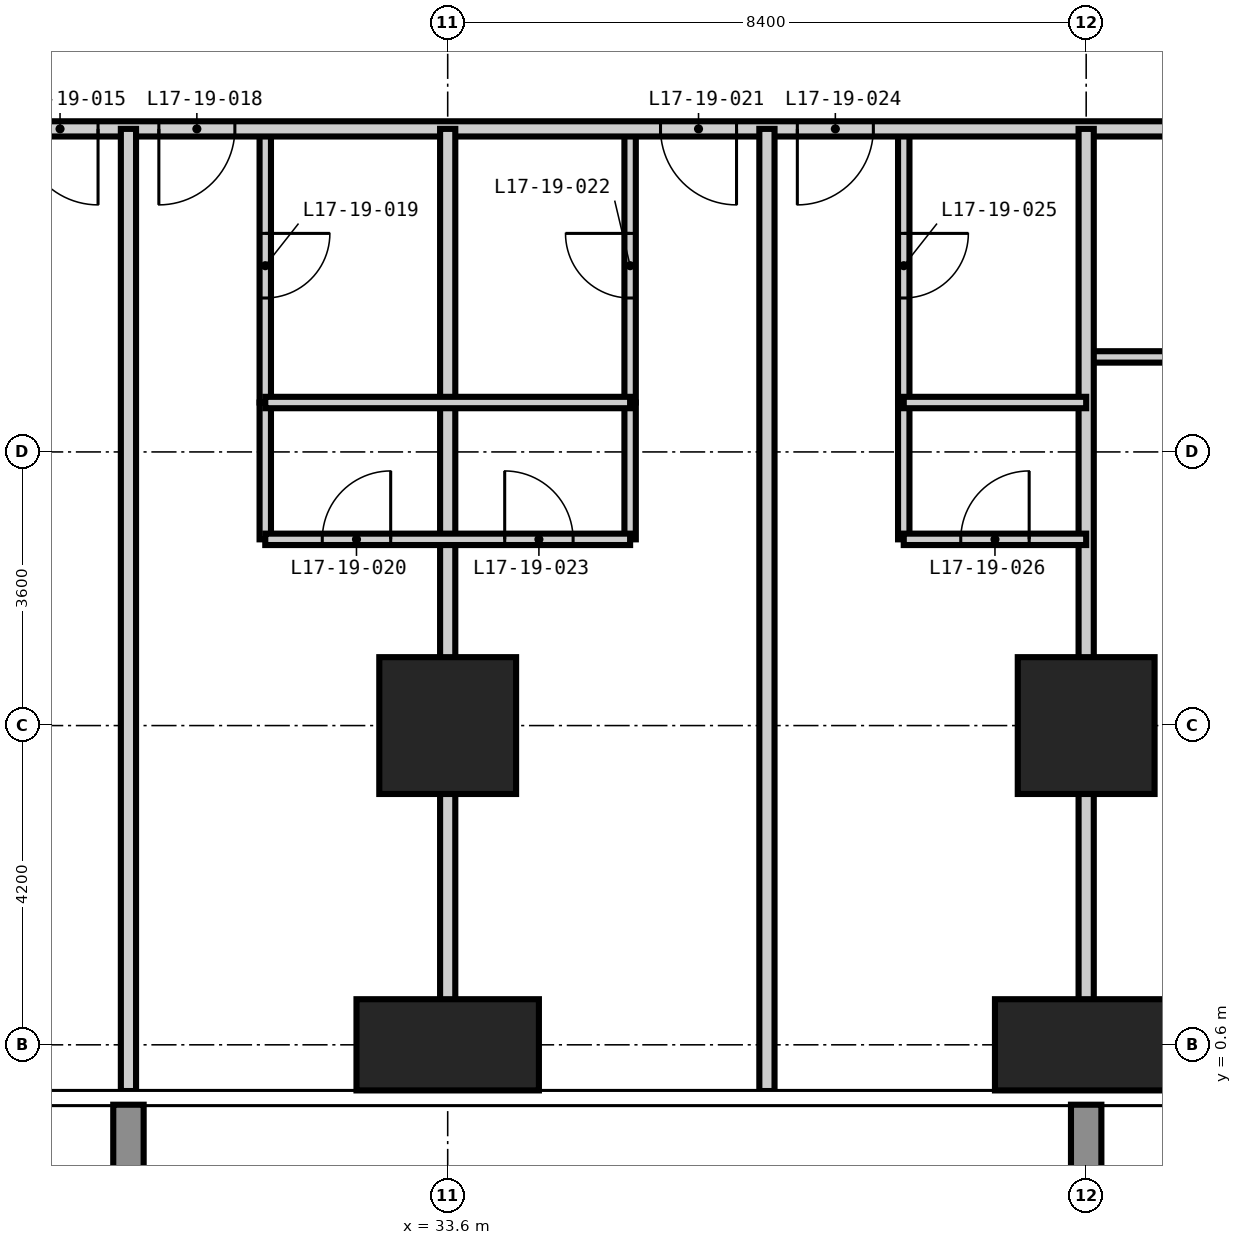
"""IFC4 building model, lengths in metres.
Left out: names, types, materials, properties, quantities, classifications, styles, units other than length and angle.
Written with IfcOpenShell. Run it as: python <this file> out.ifc"""

import sys

from ifc_helpers import new_model, si_unit, direction, frame, frame_2d, origin, origin_2d, place, context, subcontext, project, spatial, rectangle, extrude, element, fill, save


model = new_model("IFC4")
c1 = context("Model", 3, precision=1e-05, world=origin(), true_north=direction((0.0, 1.0)))
c2 = subcontext(c1, "Body", "Model", "MODEL_VIEW")
j1 = project(units=[si_unit("LENGTHUNIT", "METRE"), si_unit("PLANEANGLEUNIT", "RADIAN")], contexts=[c1])
p1 = place(None, origin())
s1 = spatial("IfcSite", under=j1, at=p1, CompositionType="ELEMENT")
p2 = place(p1, origin())
s2 = spatial("IfcBuilding", under=s1, at=p2, CompositionType="ELEMENT")
p3 = place(p2, frame((0.0, 0.0, 70.2)))
s3 = spatial("IfcBuildingStorey", under=s2, at=p3, CompositionType="ELEMENT", Elevation=70.2)
p4 = place(p3, frame((33.6, 0.6, -0.35), z_axis=(0.0, 0.0, 1.0), x_axis=(1.0, 0.0, 0.0)))
e1 = element("IfcColumn", 1, at=p4, inside=s3, PredefinedType="COLUMN", context=c2, shape_type="SweptSolid", body=[
    extrude(rectangle(XDim=2.4, YDim=1.2, at=origin_2d()), origin(), (0.0, 0.0, 1.0), 3.6),
])
p5 = place(p3, frame((33.6, 4.8, -0.35), z_axis=(0.0, 0.0, 1.0), x_axis=(1.0, 0.0, 0.0)))
e2 = element("IfcColumn", 2, at=p5, inside=s3, PredefinedType="COLUMN", context=c2, shape_type="SweptSolid", body=[
    extrude(rectangle(XDim=1.8, YDim=1.8, at=origin_2d()), origin(), (0.0, 0.0, 1.0), 3.6),
])
p6 = place(p3, frame((42.0, 0.6, -0.35), z_axis=(0.0, 0.0, 1.0), x_axis=(1.0, 0.0, 0.0)))
e3 = element("IfcColumn", 3, at=p6, inside=s3, PredefinedType="COLUMN", context=c2, shape_type="SweptSolid", body=[
    extrude(rectangle(XDim=2.4, YDim=1.2, at=origin_2d()), origin(), (0.0, 0.0, 1.0), 3.6),
])
p7 = place(p3, frame((42.0, 4.8, -0.35), z_axis=(0.0, 0.0, 1.0), x_axis=(1.0, 0.0, 0.0)))
e4 = element("IfcColumn", 4, at=p7, inside=s3, PredefinedType="COLUMN", context=c2, shape_type="SweptSolid", body=[
    extrude(rectangle(XDim=1.8, YDim=1.8, at=origin_2d()), origin(), (0.0, 0.0, 1.0), 3.6),
])
p8 = place(p3, frame((31.2, 9.05, 0.0), z_axis=(0.0, 0.0, 1.0), x_axis=(0.0, 1.0, 0.0)))
e5 = element("IfcWall", 5, at=p8, inside=s3, PredefinedType="PARTITIONING", context=c2, shape_type="SweptSolid", body=[
    extrude(rectangle(XDim=3.6, YDim=0.15, at=frame_2d((1.8, 0.0))), origin(), (0.0, 0.0, 1.0), 3.25),
])
p9 = place(p8, frame((1.375, 0.0, 0.0)))
e6 = element("IfcOpeningElement", 6, at=p9, cuts=e5, PredefinedType="OPENING", context=c2, shape_type="SweptSolid", body=[
    extrude(rectangle(XDim=0.85, YDim=2.1, at=frame_2d((0.425, 1.05))), frame((0.0, 0.085, 0.0), z_axis=(0.0, -1.0, 0.0), x_axis=(1.0, 0.0, 0.0)), (0.0, 0.0, 1.0), 0.17),
])
p10 = place(p3, frame((36.0, 9.05, 0.0), z_axis=(0.0, 0.0, 1.0), x_axis=(0.0, 1.0, 0.0)))
e7 = element("IfcWall", 7, at=p10, inside=s3, PredefinedType="PARTITIONING", context=c2, shape_type="SweptSolid", body=[
    extrude(rectangle(XDim=3.6, YDim=0.15, at=frame_2d((1.8, 0.0))), origin(), (0.0, 0.0, 1.0), 3.25),
])
p11 = place(p10, frame((1.375, 0.0, 0.0)))
e8 = element("IfcOpeningElement", 8, at=p11, cuts=e7, PredefinedType="OPENING", context=c2, shape_type="SweptSolid", body=[
    extrude(rectangle(XDim=0.85, YDim=2.1, at=frame_2d((0.425, 1.05))), frame((0.0, 0.085, 0.0), z_axis=(0.0, -1.0, 0.0), x_axis=(1.0, 0.0, 0.0)), (0.0, 0.0, 1.0), 0.17),
])
p12 = place(p3, frame((39.6, 9.05, 0.0), z_axis=(0.0, 0.0, 1.0), x_axis=(0.0, 1.0, 0.0)))
e9 = element("IfcWall", 9, at=p12, inside=s3, PredefinedType="PARTITIONING", context=c2, shape_type="SweptSolid", body=[
    extrude(rectangle(XDim=3.6, YDim=0.15, at=frame_2d((1.8, 0.0))), origin(), (0.0, 0.0, 1.0), 3.25),
])
p13 = place(p12, frame((1.375, 0.0, 0.0)))
e10 = element("IfcOpeningElement", 10, at=p13, cuts=e9, PredefinedType="OPENING", context=c2, shape_type="SweptSolid", body=[
    extrude(rectangle(XDim=0.85, YDim=2.1, at=frame_2d((0.425, 1.05))), frame((0.0, 0.085, 0.0), z_axis=(0.0, -1.0, 0.0), x_axis=(1.0, 0.0, 0.0)), (0.0, 0.0, 1.0), 0.17),
])
p14 = place(p3, frame((42.0, 9.65, 0.0), z_axis=(0.0, 0.0, 1.0), x_axis=(1.0, 0.0, 0.0)))
e11 = element("IfcWall", 11, at=p14, inside=s3, PredefinedType="PARTITIONING", context=c2, shape_type="SweptSolid", body=[
    extrude(rectangle(XDim=2.95, YDim=0.15, at=frame_2d((1.475, 0.0))), origin(), (0.0, 0.0, 1.0), 3.25),
])
p15 = place(p3, frame((44.95, 12.65, 0.0), z_axis=(0.0, 0.0, 1.0), x_axis=(-1.0, 0.0, 0.0)))
e12 = element("IfcWall", 12, at=p15, inside=s3, PredefinedType="PARTITIONING", context=c2, shape_type="SweptSolid", body=[
    extrude(rectangle(XDim=32.3, YDim=0.2, at=frame_2d((16.15, 0.0))), origin(), (0.0, 0.0, 1.0), 3.25),
])
p16 = place(p15, frame((24.35, 0.0, 0.0)))
e13 = element("IfcOpeningElement", 13, at=p16, cuts=e12, PredefinedType="OPENING", context=c2, shape_type="SweptSolid", body=[
    extrude(rectangle(XDim=1.0, YDim=2.2, at=frame_2d((0.5, 1.1))), frame((0.0, 0.11, 0.0), z_axis=(0.0, -1.0, 0.0), x_axis=(1.0, 0.0, 0.0)), (0.0, 0.0, 1.0), 0.22),
])
p17 = place(p15, frame((22.55, 0.0, 0.0)))
e14 = element("IfcOpeningElement", 14, at=p17, cuts=e12, PredefinedType="OPENING", context=c2, shape_type="SweptSolid", body=[
    extrude(rectangle(XDim=1.0, YDim=2.2, at=frame_2d((0.5, 1.1))), frame((0.0, 0.11, 0.0), z_axis=(0.0, -1.0, 0.0), x_axis=(1.0, 0.0, 0.0)), (0.0, 0.0, 1.0), 0.22),
])
p18 = place(p15, frame((15.95, 0.0, 0.0)))
e15 = element("IfcOpeningElement", 15, at=p18, cuts=e12, PredefinedType="OPENING", context=c2, shape_type="SweptSolid", body=[
    extrude(rectangle(XDim=1.0, YDim=2.2, at=frame_2d((0.5, 1.1))), frame((0.0, 0.11, 0.0), z_axis=(0.0, -1.0, 0.0), x_axis=(1.0, 0.0, 0.0)), (0.0, 0.0, 1.0), 0.22),
])
p19 = place(p15, frame((14.15, 0.0, 0.0)))
e16 = element("IfcOpeningElement", 16, at=p19, cuts=e12, PredefinedType="OPENING", context=c2, shape_type="SweptSolid", body=[
    extrude(rectangle(XDim=1.0, YDim=2.2, at=frame_2d((0.5, 1.1))), frame((0.0, 0.11, 0.0), z_axis=(0.0, -1.0, 0.0), x_axis=(1.0, 0.0, 0.0)), (0.0, 0.0, 1.0), 0.22),
])
p20 = place(p15, frame((7.55, 0.0, 0.0)))
e17 = element("IfcOpeningElement", 17, at=p20, cuts=e12, PredefinedType="OPENING", context=c2, shape_type="SweptSolid", body=[
    extrude(rectangle(XDim=1.0, YDim=2.2, at=frame_2d((0.5, 1.1))), frame((0.0, 0.11, 0.0), z_axis=(0.0, -1.0, 0.0), x_axis=(1.0, 0.0, 0.0)), (0.0, 0.0, 1.0), 0.22),
])
p21 = place(p15, frame((5.75, 0.0, 0.0)))
e18 = element("IfcOpeningElement", 18, at=p21, cuts=e12, PredefinedType="OPENING", context=c2, shape_type="SweptSolid", body=[
    extrude(rectangle(XDim=1.0, YDim=2.2, at=frame_2d((0.5, 1.1))), frame((0.0, 0.11, 0.0), z_axis=(0.0, -1.0, 0.0), x_axis=(1.0, 0.0, 0.0)), (0.0, 0.0, 1.0), 0.22),
])
for number, where, z_axis, x_axis in (
    (19, (29.4, -0.008, 0.0), (0.0, 0.0, 1.0), (0.0, 1.0, 0.0)),
    (20, (33.6, -0.008, 0.0), (0.0, 0.0, 1.0), (0.0, 1.0, 0.0)),
    (21, (37.8, -0.008, 0.0), (0.0, 0.0, 1.0), (0.0, 1.0, 0.0)),
    (22, (42.0, -0.008, 0.0), (0.0, 0.0, 1.0), (0.0, 1.0, 0.0)),
):
    element("IfcWall", number, at=place(p3, frame(where, z_axis=z_axis, x_axis=x_axis)), inside=s3, PredefinedType="PARTITIONING", context=c2, shape_type="SweptSolid", body=[
        extrude(rectangle(XDim=12.658, YDim=0.2, at=frame_2d((6.329, 0.0))), origin(), (0.0, 0.0, 1.0), 3.25),
    ])
for number, where, z_axis, x_axis in (
    (23, (31.2, 7.25, 0.0), (0.0, 0.0, 1.0), (0.0, 1.0, 0.0)),
    (24, (36.0, 7.25, 0.0), (0.0, 0.0, 1.0), (0.0, 1.0, 0.0)),
    (25, (39.6, 7.25, 0.0), (0.0, 0.0, 1.0), (0.0, 1.0, 0.0)),
):
    element("IfcWall", number, at=place(p3, frame(where, z_axis=z_axis, x_axis=x_axis)), inside=s3, PredefinedType="PARTITIONING", context=c2, shape_type="SweptSolid", body=[
        extrude(rectangle(XDim=1.8, YDim=0.15, at=frame_2d((0.9, 0.0))), origin(), (0.0, 0.0, 1.0), 3.25),
    ])
p22 = place(p3, frame((31.2, 7.25, 0.0), z_axis=(0.0, 0.0, 1.0), x_axis=(1.0, 0.0, 0.0)))
e26 = element("IfcWall", 26, at=p22, inside=s3, PredefinedType="PARTITIONING", context=c2, shape_type="SweptSolid", body=[
    extrude(rectangle(XDim=4.8, YDim=0.15, at=frame_2d((2.4, 0.0))), origin(), (0.0, 0.0, 1.0), 3.25),
])
p23 = place(p22, frame((0.75, 0.0, 0.0)))
e27 = element("IfcOpeningElement", 27, at=p23, cuts=e26, PredefinedType="OPENING", context=c2, shape_type="SweptSolid", body=[
    extrude(rectangle(XDim=0.9, YDim=2.1, at=frame_2d((0.45, 1.05))), frame((0.0, 0.085, 0.0), z_axis=(0.0, -1.0, 0.0), x_axis=(1.0, 0.0, 0.0)), (0.0, 0.0, 1.0), 0.17),
])
p24 = place(p22, frame((3.15, 0.0, 0.0)))
e28 = element("IfcOpeningElement", 28, at=p24, cuts=e26, PredefinedType="OPENING", context=c2, shape_type="SweptSolid", body=[
    extrude(rectangle(XDim=0.9, YDim=2.1, at=frame_2d((0.45, 1.05))), frame((0.0, 0.085, 0.0), z_axis=(0.0, -1.0, 0.0), x_axis=(1.0, 0.0, 0.0)), (0.0, 0.0, 1.0), 0.17),
])
p25 = place(p3, frame((39.6, 7.25, 0.0), z_axis=(0.0, 0.0, 1.0), x_axis=(1.0, 0.0, 0.0)))
e29 = element("IfcWall", 29, at=p25, inside=s3, PredefinedType="PARTITIONING", context=c2, shape_type="SweptSolid", body=[
    extrude(rectangle(XDim=2.4, YDim=0.15, at=frame_2d((1.2, 0.0))), origin(), (0.0, 0.0, 1.0), 3.25),
])
p26 = place(p25, frame((0.75, 0.0, 0.0)))
e30 = element("IfcOpeningElement", 30, at=p26, cuts=e29, PredefinedType="OPENING", context=c2, shape_type="SweptSolid", body=[
    extrude(rectangle(XDim=0.9, YDim=2.1, at=frame_2d((0.45, 1.05))), frame((0.0, 0.085, 0.0), z_axis=(0.0, -1.0, 0.0), x_axis=(1.0, 0.0, 0.0)), (0.0, 0.0, 1.0), 0.17),
])
p27 = place(p3, frame((31.2, 9.05, 0.0), z_axis=(0.0, 0.0, 1.0), x_axis=(1.0, 0.0, 0.0)))
e31 = element("IfcWall", 31, at=p27, inside=s3, PredefinedType="PARTITIONING", context=c2, shape_type="SweptSolid", body=[
    extrude(rectangle(XDim=4.8, YDim=0.15, at=frame_2d((2.4, 0.0))), origin(), (0.0, 0.0, 1.0), 3.25),
])
p28 = place(p3, frame((39.6, 9.05, 0.0), z_axis=(0.0, 0.0, 1.0), x_axis=(1.0, 0.0, 0.0)))
e32 = element("IfcWall", 32, at=p28, inside=s3, PredefinedType="PARTITIONING", context=c2, shape_type="SweptSolid", body=[
    extrude(rectangle(XDim=2.4, YDim=0.15, at=frame_2d((1.2, 0.0))), origin(), (0.0, 0.0, 1.0), 3.25),
])
p29 = place(p18, origin())
e33 = element("IfcDoor", 33, at=p29, inside=s3, OperationType="SINGLE_SWING_LEFT", PredefinedType="DOOR", context=c2, shape_type="SweptSolid", body=[
    extrude(rectangle(XDim=1.0, YDim=2.2, at=frame_2d((0.5, 1.1))), frame((0.0, 0.025, 0.0), z_axis=(0.0, -1.0, 0.0), x_axis=(1.0, 0.0, 0.0)), (0.0, 0.0, 1.0), 0.05),
])
fill(e15, e33)
p30 = place(p19, origin())
e34 = element("IfcDoor", 34, at=p30, inside=s3, OperationType="SINGLE_SWING_RIGHT", PredefinedType="DOOR", context=c2, shape_type="SweptSolid", body=[
    extrude(rectangle(XDim=1.0, YDim=2.2, at=frame_2d((0.5, 1.1))), frame((0.0, 0.025, 0.0), z_axis=(0.0, -1.0, 0.0), x_axis=(1.0, 0.0, 0.0)), (0.0, 0.0, 1.0), 0.05),
])
fill(e16, e34)
p31 = place(p9, frame((0.85, 0.0, 0.0), z_axis=(0.0, 0.0, 1.0), x_axis=(-1.0, 0.0, 0.0)))
e35 = element("IfcDoor", 35, at=p31, inside=s3, OperationType="SINGLE_SWING_LEFT", PredefinedType="DOOR", context=c2, shape_type="SweptSolid", body=[
    extrude(rectangle(XDim=0.85, YDim=2.1, at=frame_2d((0.425, 1.05))), frame((0.0, 0.025, 0.0), z_axis=(0.0, -1.0, 0.0), x_axis=(1.0, 0.0, 0.0)), (0.0, 0.0, 1.0), 0.05),
])
fill(e6, e35)
p32 = place(p23, origin())
e36 = element("IfcDoor", 36, at=p32, inside=s3, OperationType="SINGLE_SWING_RIGHT", PredefinedType="DOOR", context=c2, shape_type="SweptSolid", body=[
    extrude(rectangle(XDim=0.9, YDim=2.1, at=frame_2d((0.45, 1.05))), frame((0.0, 0.025, 0.0), z_axis=(0.0, -1.0, 0.0), x_axis=(1.0, 0.0, 0.0)), (0.0, 0.0, 1.0), 0.05),
])
fill(e27, e36)
p33 = place(p20, origin())
e37 = element("IfcDoor", 37, at=p33, inside=s3, OperationType="SINGLE_SWING_LEFT", PredefinedType="DOOR", context=c2, shape_type="SweptSolid", body=[
    extrude(rectangle(XDim=1.0, YDim=2.2, at=frame_2d((0.5, 1.1))), frame((0.0, 0.025, 0.0), z_axis=(0.0, -1.0, 0.0), x_axis=(1.0, 0.0, 0.0)), (0.0, 0.0, 1.0), 0.05),
])
fill(e17, e37)
p34 = place(p11, origin())
e38 = element("IfcDoor", 38, at=p34, inside=s3, OperationType="SINGLE_SWING_RIGHT", PredefinedType="DOOR", context=c2, shape_type="SweptSolid", body=[
    extrude(rectangle(XDim=0.85, YDim=2.1, at=frame_2d((0.425, 1.05))), frame((0.0, 0.025, 0.0), z_axis=(0.0, -1.0, 0.0), x_axis=(1.0, 0.0, 0.0)), (0.0, 0.0, 1.0), 0.05),
])
fill(e8, e38)
p35 = place(p24, origin())
e39 = element("IfcDoor", 39, at=p35, inside=s3, OperationType="SINGLE_SWING_LEFT", PredefinedType="DOOR", context=c2, shape_type="SweptSolid", body=[
    extrude(rectangle(XDim=0.9, YDim=2.1, at=frame_2d((0.45, 1.05))), frame((0.0, 0.025, 0.0), z_axis=(0.0, -1.0, 0.0), x_axis=(1.0, 0.0, 0.0)), (0.0, 0.0, 1.0), 0.05),
])
fill(e28, e39)
p36 = place(p21, origin())
e40 = element("IfcDoor", 40, at=p36, inside=s3, OperationType="SINGLE_SWING_RIGHT", PredefinedType="DOOR", context=c2, shape_type="SweptSolid", body=[
    extrude(rectangle(XDim=1.0, YDim=2.2, at=frame_2d((0.5, 1.1))), frame((0.0, 0.025, 0.0), z_axis=(0.0, -1.0, 0.0), x_axis=(1.0, 0.0, 0.0)), (0.0, 0.0, 1.0), 0.05),
])
fill(e18, e40)
p37 = place(p13, frame((0.85, 0.0, 0.0), z_axis=(0.0, 0.0, 1.0), x_axis=(-1.0, 0.0, 0.0)))
e41 = element("IfcDoor", 41, at=p37, inside=s3, OperationType="SINGLE_SWING_LEFT", PredefinedType="DOOR", context=c2, shape_type="SweptSolid", body=[
    extrude(rectangle(XDim=0.85, YDim=2.1, at=frame_2d((0.425, 1.05))), frame((0.0, 0.025, 0.0), z_axis=(0.0, -1.0, 0.0), x_axis=(1.0, 0.0, 0.0)), (0.0, 0.0, 1.0), 0.05),
])
fill(e10, e41)
p38 = place(p26, origin())
e42 = element("IfcDoor", 42, at=p38, inside=s3, OperationType="SINGLE_SWING_RIGHT", PredefinedType="DOOR", context=c2, shape_type="SweptSolid", body=[
    extrude(rectangle(XDim=0.9, YDim=2.1, at=frame_2d((0.45, 1.05))), frame((0.0, 0.025, 0.0), z_axis=(0.0, -1.0, 0.0), x_axis=(1.0, 0.0, 0.0)), (0.0, 0.0, 1.0), 0.05),
])
fill(e30, e42)
save(model, sys.argv[1])
